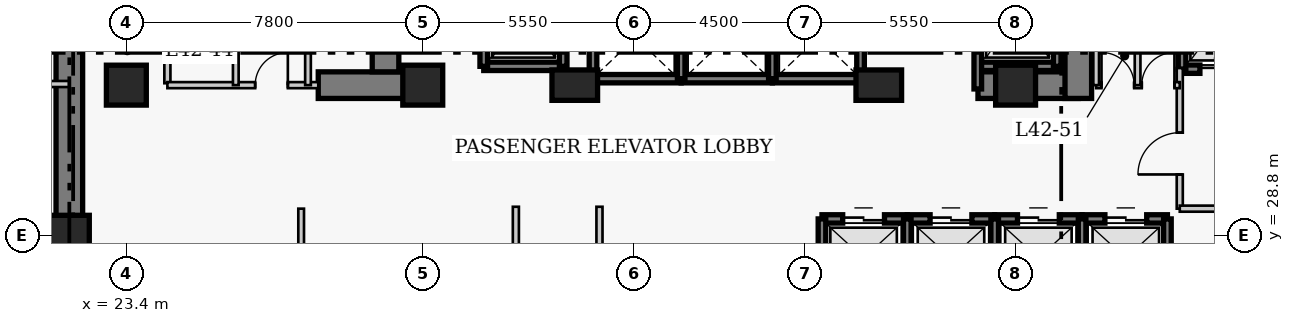
"""IFC4 building model, lengths in metres.
Left out: names, types, materials, properties, quantities, classifications, styles, units other than length and angle.
Written with IfcOpenShell. Run it as: python <this file> out.ifc"""

import sys

from ifc_helpers import new_model, si_unit, direction, frame, frame_2d, origin, origin_2d, place, context, subcontext, project, spatial, rectangle, extrude, element, fill, save


model = new_model("IFC4")
c1 = context("Model", 3, precision=1e-05, world=origin(), true_north=direction((0.0, 1.0)))
c2 = subcontext(c1, "Body", "Model", "MODEL_VIEW")
j1 = project(units=[si_unit("LENGTHUNIT", "METRE"), si_unit("PLANEANGLEUNIT", "RADIAN")], contexts=[c1])
p1 = place(None, origin())
s1 = spatial("IfcSite", under=j1, at=p1, CompositionType="ELEMENT")
p2 = place(p1, origin())
s2 = spatial("IfcBuilding", under=s1, at=p2, CompositionType="ELEMENT")
p3 = place(p2, frame((0.0, 0.0, 168.8)))
s3 = spatial("IfcBuildingStorey", under=s2, at=p3, CompositionType="ELEMENT", Elevation=168.8)
p4 = place(p3, frame((21.9, 27.05, 0.0), z_axis=(0.0, 0.0, 1.0), x_axis=(0.0, 1.0, 0.0)))
e1 = element("IfcWall", 1, at=p4, inside=s3, PredefinedType="SHEAR", context=c2, shape_type="SweptSolid", body=[
    extrude(rectangle(XDim=13.62, YDim=0.7, at=frame_2d((6.81, 0.0))), origin(), (0.0, 0.0, 1.0), 3.8),
])
p5 = place(p3, frame((28.45, 32.75, 0.0), z_axis=(0.0, 0.0, 1.0), x_axis=(1.0, 0.0, 0.0)))
e2 = element("IfcWall", 2, at=p5, inside=s3, PredefinedType="SHEAR", context=c2, shape_type="SweptSolid", body=[
    extrude(rectangle(XDim=2.4, YDim=0.7, at=frame_2d((1.2, 0.0))), origin(), (0.0, 0.0, 1.0), 3.8),
])
p6 = place(p3, frame((45.81, 32.75, 0.0), z_axis=(0.0, 0.0, 1.0), x_axis=(1.0, 0.0, 0.0)))
e3 = element("IfcWall", 3, at=p6, inside=s3, PredefinedType="SHEAR", context=c2, shape_type="SweptSolid", body=[
    extrude(rectangle(XDim=2.64, YDim=0.7, at=frame_2d((1.32, 0.0))), origin(), (0.0, 0.0, 1.0), 3.8),
])
p7 = place(p3, frame((30.22, 33.1, 0.0), z_axis=(0.0, 0.0, 1.0), x_axis=(0.0, 1.0, 0.0)))
e4 = element("IfcWall", 4, at=p7, inside=s3, PredefinedType="SHEAR", context=c2, shape_type="SweptSolid", body=[
    extrude(rectangle(XDim=7.22, YDim=0.7, at=frame_2d((3.61, 0.0))), origin(), (0.0, 0.0, 1.0), 3.8),
])
p8 = place(p3, frame((48.45, 32.4, 0.0), z_axis=(0.0, 0.0, 1.0), x_axis=(0.0, 1.0, 0.0)))
e5 = element("IfcWall", 5, at=p8, inside=s3, PredefinedType="SHEAR", context=c2, shape_type="SweptSolid", body=[
    extrude(rectangle(XDim=7.92, YDim=0.7, at=frame_2d((3.96, 0.0))), origin(), (0.0, 0.0, 1.0), 3.8),
])
p9 = place(p8, frame((5.8, 0.0, 0.0)))
e6 = element("IfcOpeningElement", 6, at=p9, cuts=e5, PredefinedType="OPENING", context=c2, shape_type="SweptSolid", body=[
    extrude(rectangle(XDim=1.1, YDim=2.15, at=frame_2d((0.55, 1.075))), frame((0.0, 0.36, 0.0), z_axis=(0.0, -1.0, 0.0), x_axis=(1.0, 0.0, 0.0)), (0.0, 0.0, 1.0), 0.72),
])
for number, where, z_axis, x_axis in (
    (7, (21.9, 28.8, 0.0), (0.0, 0.0, 1.0), (1.0, 0.0, 0.0)),
    (8, (23.4, 32.75, 0.0), (0.0, 0.0, 1.0), (1.0, 0.0, 0.0)),
    (9, (31.2, 32.75, 0.0), (0.0, 0.0, 1.0), (1.0, 0.0, 0.0)),
):
    element("IfcColumn", number, at=place(p3, frame(where, z_axis=z_axis, x_axis=x_axis)), inside=s3, PredefinedType="COLUMN", context=c2, shape_type="SweptSolid", body=[
        extrude(rectangle(XDim=1.05, YDim=1.05, at=origin_2d()), origin(), (0.0, 0.0, 1.0), 3.8),
    ])
for number, where, z_axis, x_axis in (
    (10, (35.2, 32.75, 0.0), (0.0, 0.0, 1.0), (1.0, 0.0, 0.0)),
    (11, (43.2, 32.75, 0.0), (0.0, 0.0, 1.0), (1.0, 0.0, 0.0)),
):
    element("IfcColumn", number, at=place(p3, frame(where, z_axis=z_axis, x_axis=x_axis)), inside=s3, PredefinedType="COLUMN", context=c2, shape_type="SweptSolid", body=[
        extrude(rectangle(XDim=1.2, YDim=0.8, at=origin_2d()), origin(), (0.0, 0.0, 1.0), 3.8),
    ])
p10 = place(p3, frame((46.8, 32.75, 0.0), z_axis=(0.0, 0.0, 1.0), x_axis=(1.0, 0.0, 0.0)))
e12 = element("IfcColumn", 12, at=p10, inside=s3, PredefinedType="COLUMN", context=c2, shape_type="SweptSolid", body=[
    extrude(rectangle(XDim=1.05, YDim=1.05, at=origin_2d()), origin(), (0.0, 0.0, 1.0), 3.8),
])
p11 = place(p3, frame((41.705, 29.23, 0.0), z_axis=(0.0, 0.0, 1.0), x_axis=(1.0, 0.0, 0.0)))
e13 = element("IfcWall", 13, at=p11, inside=s3, PredefinedType="SHEAR", context=c2, shape_type="SweptSolid", body=[
    extrude(rectangle(XDim=2.245, YDim=0.22, at=frame_2d((1.123, 0.0))), origin(), (0.0, 0.0, 1.0), 3.8),
])
p12 = place(p11, frame((0.545, 0.0, 0.0)))
e14 = element("IfcOpeningElement", 14, at=p12, cuts=e13, PredefinedType="OPENING", context=c2, shape_type="SweptSolid", body=[
    extrude(rectangle(XDim=1.1, YDim=2.15, at=frame_2d((0.55, 1.075))), frame((0.0, 0.12, 0.0), z_axis=(0.0, -1.0, 0.0), x_axis=(1.0, 0.0, 0.0)), (0.0, 0.0, 1.0), 0.24),
])
p13 = place(p3, frame((41.705, 27.17, 0.0), z_axis=(0.0, 0.0, 1.0), x_axis=(0.0, 1.0, 0.0)))
e15 = element("IfcWall", 15, at=p13, inside=s3, PredefinedType="SHEAR", context=c2, shape_type="SweptSolid", body=[
    extrude(rectangle(XDim=2.06, YDim=0.2, at=frame_2d((1.03, 0.0))), origin(), (0.0, 0.0, 1.0), 3.8),
])
p14 = place(p3, frame((43.95, 29.23, 0.0), z_axis=(0.0, 0.0, 1.0), x_axis=(1.0, 0.0, 0.0)))
e16 = element("IfcWall", 16, at=p14, inside=s3, PredefinedType="SHEAR", context=c2, shape_type="SweptSolid", body=[
    extrude(rectangle(XDim=2.3, YDim=0.22, at=frame_2d((1.15, 0.0))), origin(), (0.0, 0.0, 1.0), 3.8),
])
p15 = place(p14, frame((0.6, 0.0, 0.0)))
e17 = element("IfcOpeningElement", 17, at=p15, cuts=e16, PredefinedType="OPENING", context=c2, shape_type="SweptSolid", body=[
    extrude(rectangle(XDim=1.1, YDim=2.15, at=frame_2d((0.55, 1.075))), frame((0.0, 0.12, 0.0), z_axis=(0.0, -1.0, 0.0), x_axis=(1.0, 0.0, 0.0)), (0.0, 0.0, 1.0), 0.24),
])
p16 = place(p3, frame((43.95, 27.17, 0.0), z_axis=(0.0, 0.0, 1.0), x_axis=(0.0, 1.0, 0.0)))
e18 = element("IfcWall", 18, at=p16, inside=s3, PredefinedType="SHEAR", context=c2, shape_type="SweptSolid", body=[
    extrude(rectangle(XDim=2.06, YDim=0.2, at=frame_2d((1.03, 0.0))), origin(), (0.0, 0.0, 1.0), 3.8),
])
p17 = place(p3, frame((46.25, 29.23, 0.0), z_axis=(0.0, 0.0, 1.0), x_axis=(1.0, 0.0, 0.0)))
e19 = element("IfcWall", 19, at=p17, inside=s3, PredefinedType="SHEAR", context=c2, shape_type="SweptSolid", body=[
    extrude(rectangle(XDim=2.3, YDim=0.22, at=frame_2d((1.15, 0.0))), origin(), (0.0, 0.0, 1.0), 3.8),
])
p18 = place(p17, frame((0.6, 0.0, 0.0)))
e20 = element("IfcOpeningElement", 20, at=p18, cuts=e19, PredefinedType="OPENING", context=c2, shape_type="SweptSolid", body=[
    extrude(rectangle(XDim=1.1, YDim=2.15, at=frame_2d((0.55, 1.075))), frame((0.0, 0.12, 0.0), z_axis=(0.0, -1.0, 0.0), x_axis=(1.0, 0.0, 0.0)), (0.0, 0.0, 1.0), 0.24),
])
p19 = place(p3, frame((46.25, 27.17, 0.0), z_axis=(0.0, 0.0, 1.0), x_axis=(0.0, 1.0, 0.0)))
e21 = element("IfcWall", 21, at=p19, inside=s3, PredefinedType="SHEAR", context=c2, shape_type="SweptSolid", body=[
    extrude(rectangle(XDim=2.06, YDim=0.2, at=frame_2d((1.03, 0.0))), origin(), (0.0, 0.0, 1.0), 3.8),
])
p20 = place(p3, frame((48.55, 29.23, 0.0), z_axis=(0.0, 0.0, 1.0), x_axis=(1.0, 0.0, 0.0)))
e22 = element("IfcWall", 22, at=p20, inside=s3, PredefinedType="SHEAR", context=c2, shape_type="SweptSolid", body=[
    extrude(rectangle(XDim=2.245, YDim=0.22, at=frame_2d((1.123, 0.0))), origin(), (0.0, 0.0, 1.0), 3.8),
])
p21 = place(p20, frame((0.6, 0.0, 0.0)))
e23 = element("IfcOpeningElement", 23, at=p21, cuts=e22, PredefinedType="OPENING", context=c2, shape_type="SweptSolid", body=[
    extrude(rectangle(XDim=1.1, YDim=2.15, at=frame_2d((0.55, 1.075))), frame((0.0, 0.12, 0.0), z_axis=(0.0, -1.0, 0.0), x_axis=(1.0, 0.0, 0.0)), (0.0, 0.0, 1.0), 0.24),
])
for number, where, z_axis, x_axis in (
    (24, (48.55, 27.17, 0.0), (0.0, 0.0, 1.0), (0.0, 1.0, 0.0)),
    (25, (50.795, 27.17, 0.0), (0.0, 0.0, 1.0), (0.0, 1.0, 0.0)),
):
    element("IfcWall", number, at=place(p3, frame(where, z_axis=z_axis, x_axis=x_axis)), inside=s3, PredefinedType="SHEAR", context=c2, shape_type="SweptSolid", body=[
        extrude(rectangle(XDim=2.06, YDim=0.2, at=frame_2d((1.03, 0.0))), origin(), (0.0, 0.0, 1.0), 3.8),
    ])
p22 = place(p3, frame((35.68, 32.92, 0.0), z_axis=(0.0, 0.0, 1.0), x_axis=(1.0, 0.0, 0.0)))
e26 = element("IfcWall", 26, at=p22, inside=s3, PredefinedType="SHEAR", context=c2, shape_type="SweptSolid", body=[
    extrude(rectangle(XDim=2.32, YDim=0.22, at=frame_2d((1.16, 0.0))), origin(), (0.0, 0.0, 1.0), 3.8),
])
p23 = place(p3, frame((35.68, 32.92, 0.0), z_axis=(0.0, 0.0, 1.0), x_axis=(0.0, 1.0, 0.0)))
e27 = element("IfcWall", 27, at=p23, inside=s3, PredefinedType="SHEAR", context=c2, shape_type="SweptSolid", body=[
    extrude(rectangle(XDim=2.16, YDim=0.2, at=frame_2d((1.08, 0.0))), origin(), (0.0, 0.0, 1.0), 3.8),
])
p24 = place(p3, frame((38.0, 32.92, 0.0), z_axis=(0.0, 0.0, 1.0), x_axis=(1.0, 0.0, 0.0)))
e28 = element("IfcWall", 28, at=p24, inside=s3, PredefinedType="SHEAR", context=c2, shape_type="SweptSolid", body=[
    extrude(rectangle(XDim=2.4, YDim=0.22, at=frame_2d((1.2, 0.0))), origin(), (0.0, 0.0, 1.0), 3.8),
])
p25 = place(p3, frame((38.0, 32.92, 0.0), z_axis=(0.0, 0.0, 1.0), x_axis=(0.0, 1.0, 0.0)))
e29 = element("IfcWall", 29, at=p25, inside=s3, PredefinedType="SHEAR", context=c2, shape_type="SweptSolid", body=[
    extrude(rectangle(XDim=2.16, YDim=0.2, at=frame_2d((1.08, 0.0))), origin(), (0.0, 0.0, 1.0), 3.8),
])
p26 = place(p3, frame((40.4, 32.92, 0.0), z_axis=(0.0, 0.0, 1.0), x_axis=(1.0, 0.0, 0.0)))
e30 = element("IfcWall", 30, at=p26, inside=s3, PredefinedType="SHEAR", context=c2, shape_type="SweptSolid", body=[
    extrude(rectangle(XDim=2.32, YDim=0.22, at=frame_2d((1.16, 0.0))), origin(), (0.0, 0.0, 1.0), 3.8),
])
for number, where, z_axis, x_axis in (
    (31, (40.4, 32.92, 0.0), (0.0, 0.0, 1.0), (0.0, 1.0, 0.0)),
    (32, (42.72, 32.92, 0.0), (0.0, 0.0, 1.0), (0.0, 1.0, 0.0)),
):
    element("IfcWall", number, at=place(p3, frame(where, z_axis=z_axis, x_axis=x_axis)), inside=s3, PredefinedType="SHEAR", context=c2, shape_type="SweptSolid", body=[
        extrude(rectangle(XDim=2.16, YDim=0.2, at=frame_2d((1.08, 0.0))), origin(), (0.0, 0.0, 1.0), 3.8),
    ])
p27 = place(p3, frame((51.18, 33.17, 0.0), z_axis=(0.0, 0.0, 1.0), x_axis=(1.0, 0.0, 0.0)))
e33 = element("IfcWall", 33, at=p27, inside=s3, PredefinedType="SHEAR", context=c2, shape_type="SweptSolid", body=[
    extrude(rectangle(XDim=2.42, YDim=0.22, at=frame_2d((1.21, 0.0))), origin(), (0.0, 0.0, 1.0), 3.8),
])
p28 = place(p27, frame((0.47, 0.0, 0.0)))
e34 = element("IfcOpeningElement", 34, at=p28, cuts=e33, PredefinedType="OPENING", context=c2, shape_type="SweptSolid", body=[
    extrude(rectangle(XDim=1.3, YDim=2.15, at=frame_2d((0.65, 1.075))), frame((0.0, 0.12, 0.0), z_axis=(0.0, -1.0, 0.0), x_axis=(1.0, 0.0, 0.0)), (0.0, 0.0, 1.0), 0.24),
])
p29 = place(p3, frame((51.18, 33.17, 0.0), z_axis=(0.0, 0.0, 1.0), x_axis=(0.0, 1.0, 0.0)))
e35 = element("IfcWall", 35, at=p29, inside=s3, PredefinedType="SHEAR", context=c2, shape_type="SweptSolid", body=[
    extrude(rectangle(XDim=2.86, YDim=0.2, at=frame_2d((1.43, 0.0))), origin(), (0.0, 0.0, 1.0), 3.8),
])
p30 = place(p3, frame((32.805, 33.245, 0.0), z_axis=(0.0, 0.0, 1.0), x_axis=(1.0, 0.0, 0.0)))
e36 = element("IfcWall", 36, at=p30, inside=s3, PredefinedType="SHEAR", context=c2, shape_type="SweptSolid", body=[
    extrude(rectangle(XDim=2.09, YDim=0.22, at=frame_2d((1.045, 0.0))), origin(), (0.0, 0.0, 1.0), 3.8),
])
for number, where, z_axis, x_axis in (
    (37, (32.805, 33.245, 0.0), (0.0, 0.0, 1.0), (0.0, 1.0, 0.0)),
    (38, (34.895, 33.245, 0.0), (0.0, 0.0, 1.0), (0.0, 1.0, 0.0)),
):
    element("IfcWall", number, at=place(p3, frame(where, z_axis=z_axis, x_axis=x_axis)), inside=s3, PredefinedType="SHEAR", context=c2, shape_type="SweptSolid", body=[
        extrude(rectangle(XDim=2.91, YDim=0.2, at=frame_2d((1.455, 0.0))), origin(), (0.0, 0.0, 1.0), 3.8),
    ])
p31 = place(p3, frame((45.805, 33.245, 0.0), z_axis=(0.0, 0.0, 1.0), x_axis=(1.0, 0.0, 0.0)))
e39 = element("IfcWall", 39, at=p31, inside=s3, PredefinedType="SHEAR", context=c2, shape_type="SweptSolid", body=[
    extrude(rectangle(XDim=2.09, YDim=0.22, at=frame_2d((1.045, 0.0))), origin(), (0.0, 0.0, 1.0), 3.8),
])
p32 = place(p3, frame((45.805, 32.65, 0.0), z_axis=(0.0, 0.0, 1.0), x_axis=(0.0, 1.0, 0.0)))
e40 = element("IfcWall", 40, at=p32, inside=s3, PredefinedType="SHEAR", context=c2, shape_type="SweptSolid", body=[
    extrude(rectangle(XDim=3.505, YDim=0.2, at=frame_2d((1.752, 0.0))), origin(), (0.0, 0.0, 1.0), 3.8),
])
p33 = place(p3, frame((47.895, 33.245, 0.0), z_axis=(0.0, 0.0, 1.0), x_axis=(0.0, 1.0, 0.0)))
e41 = element("IfcWall", 41, at=p33, inside=s3, PredefinedType="SHEAR", context=c2, shape_type="SweptSolid", body=[
    extrude(rectangle(XDim=2.91, YDim=0.2, at=frame_2d((1.455, 0.0))), origin(), (0.0, 0.0, 1.0), 3.8),
])
p34 = place(p3, frame((24.48, 32.8, 0.0), z_axis=(0.0, 0.0, 1.0), x_axis=(0.0, 1.0, 0.0)))
e42 = element("IfcWall", 42, at=p34, inside=s3, PredefinedType="PARTITIONING", context=c2, shape_type="SweptSolid", body=[
    extrude(rectangle(XDim=3.57, YDim=0.16, at=frame_2d((1.785, 0.0))), origin(), (0.0, 0.0, 1.0), 3.55),
])
p35 = place(p34, frame((1.604, 0.0, 0.0)))
e43 = element("IfcOpeningElement", 43, at=p35, cuts=e42, PredefinedType="OPENING", context=c2, shape_type="SweptSolid", body=[
    extrude(rectangle(XDim=0.9, YDim=2.1, at=frame_2d((0.45, 1.05))), frame((0.0, 0.09, 0.0), z_axis=(0.0, -1.0, 0.0), x_axis=(1.0, 0.0, 0.0)), (0.0, 0.0, 1.0), 0.18),
])
p36 = place(p3, frame((51.12, 29.5, 0.0), z_axis=(0.0, 0.0, 1.0), x_axis=(0.0, 1.0, 0.0)))
e44 = element("IfcWall", 44, at=p36, inside=s3, PredefinedType="PARTITIONING", context=c2, shape_type="SweptSolid", body=[
    extrude(rectangle(XDim=3.7, YDim=0.16, at=frame_2d((1.85, 0.0))), origin(), (0.0, 0.0, 1.0), 3.55),
])
p37 = place(p36, frame((0.9, 0.0, 0.0)))
e45 = element("IfcOpeningElement", 45, at=p37, cuts=e44, PredefinedType="OPENING", context=c2, shape_type="SweptSolid", body=[
    extrude(rectangle(XDim=1.1, YDim=2.15, at=frame_2d((0.55, 1.075))), frame((0.0, 0.09, 0.0), z_axis=(0.0, -1.0, 0.0), x_axis=(1.0, 0.0, 0.0)), (0.0, 0.0, 1.0), 0.18),
])
p38 = place(p3, frame((51.12, 29.5, 0.0), z_axis=(0.0, 0.0, 1.0), x_axis=(1.0, 0.0, 0.0)))
e46 = element("IfcWall", 46, at=p38, inside=s3, PredefinedType="PARTITIONING", context=c2, shape_type="SweptSolid", body=[
    extrude(rectangle(XDim=5.63, YDim=0.16, at=frame_2d((2.815, 0.0))), origin(), (0.0, 0.0, 1.0), 3.55),
])
p39 = place(p3, frame((24.48, 32.75, 0.0), z_axis=(0.0, 0.0, 1.0), x_axis=(1.0, 0.0, 0.0)))
e47 = element("IfcWall", 47, at=p39, inside=s3, PredefinedType="PARTITIONING", context=c2, shape_type="SweptSolid", body=[
    extrude(rectangle(XDim=3.97, YDim=0.16, at=frame_2d((1.985, 0.0))), origin(), (0.0, 0.0, 1.0), 3.55),
])
p40 = place(p39, frame((2.31, 0.0, 0.0)))
e48 = element("IfcOpeningElement", 48, at=p40, cuts=e47, PredefinedType="OPENING", context=c2, shape_type="SweptSolid", body=[
    extrude(rectangle(XDim=0.86, YDim=2.05, at=frame_2d((0.43, 1.025))), frame((0.0, 0.09, 0.0), z_axis=(0.0, -1.0, 0.0), x_axis=(1.0, 0.0, 0.0)), (0.0, 0.0, 1.0), 0.18),
])
p41 = place(p3, frame((48.92, 32.75, 0.0), z_axis=(0.0, 0.0, 1.0), x_axis=(1.0, 0.0, 0.0)))
e49 = element("IfcWall", 49, at=p41, inside=s3, PredefinedType="PARTITIONING", context=c2, shape_type="SweptSolid", body=[
    extrude(rectangle(XDim=2.2, YDim=0.16, at=frame_2d((1.1, 0.0))), origin(), (0.0, 0.0, 1.0), 3.55),
])
p42 = place(p41, frame((0.14, 0.0, 0.0)))
e50 = element("IfcOpeningElement", 50, at=p42, cuts=e49, PredefinedType="OPENING", context=c2, shape_type="SweptSolid", body=[
    extrude(rectangle(XDim=0.86, YDim=2.05, at=frame_2d((0.43, 1.025))), frame((0.0, 0.09, 0.0), z_axis=(0.0, -1.0, 0.0), x_axis=(1.0, 0.0, 0.0)), (0.0, 0.0, 1.0), 0.18),
])
p43 = place(p41, frame((1.2, 0.0, 0.0)))
e51 = element("IfcOpeningElement", 51, at=p43, cuts=e49, PredefinedType="OPENING", context=c2, shape_type="SweptSolid", body=[
    extrude(rectangle(XDim=0.86, YDim=2.05, at=frame_2d((0.43, 1.025))), frame((0.0, 0.09, 0.0), z_axis=(0.0, -1.0, 0.0), x_axis=(1.0, 0.0, 0.0)), (0.0, 0.0, 1.0), 0.18),
])
for number, where, z_axis, x_axis in (
    (52, (48.92, 32.75, 0.0), (0.0, 0.0, 1.0), (0.0, 1.0, 0.0)),
    (53, (26.28, 32.75, 0.0), (0.0, 0.0, 1.0), (0.0, 1.0, 0.0)),
    (54, (28.18, 32.75, 0.0), (0.0, 0.0, 1.0), (0.0, 1.0, 0.0)),
    (55, (50.01, 32.75, 0.0), (0.0, 0.0, 1.0), (0.0, 1.0, 0.0)),
):
    element("IfcWall", number, at=place(p3, frame(where, z_axis=z_axis, x_axis=x_axis)), inside=s3, PredefinedType="PARTITIONING", context=c2, shape_type="SweptSolid", body=[
        extrude(rectangle(XDim=3.62, YDim=0.15, at=frame_2d((1.81, 0.0))), origin(), (0.0, 0.0, 1.0), 3.55),
    ])
for number, where, z_axis, x_axis in (
    (56, (33.65, 16.51, 0.0), (0.0, 0.0, 1.0), (0.0, 1.0, 0.0)),
    (57, (35.85, 16.51, 0.0), (0.0, 0.0, 1.0), (0.0, 1.0, 0.0)),
):
    element("IfcWall", number, at=place(p3, frame(where, z_axis=z_axis, x_axis=x_axis)), inside=s3, PredefinedType="PARTITIONING", context=c2, shape_type="SweptSolid", body=[
        extrude(rectangle(XDim=13.04, YDim=0.16, at=frame_2d((6.52, 0.0))), origin(), (0.0, 0.0, 1.0), 3.55),
    ])
p44 = place(p3, frame((19.41, 32.78, 0.0), z_axis=(0.0, 0.0, 1.0), x_axis=(1.0, 0.0, 0.0)))
e58 = element("IfcWall", 58, at=p44, inside=s3, PredefinedType="PARTITIONING", context=c2, shape_type="SweptSolid", body=[
    extrude(rectangle(XDim=2.49, YDim=0.16, at=frame_2d((1.245, 0.0))), origin(), (0.0, 0.0, 1.0), 3.55),
])
p45 = place(p3, frame((28.0, 16.51, 0.0), z_axis=(0.0, 0.0, 1.0), x_axis=(0.0, 1.0, 0.0)))
e59 = element("IfcWall", 59, at=p45, inside=s3, PredefinedType="PARTITIONING", context=c2, shape_type="SweptSolid", body=[
    extrude(rectangle(XDim=12.99, YDim=0.15, at=frame_2d((6.495, 0.0))), origin(), (0.0, 0.0, 1.0), 3.55),
])
p46 = place(p12, origin())
e60 = element("IfcDoor", 60, at=p46, inside=s3, OperationType="DOUBLE_DOOR_SLIDING", PredefinedType="DOOR", context=c2, shape_type="SweptSolid", body=[
    extrude(rectangle(XDim=1.1, YDim=2.15, at=frame_2d((0.55, 1.075))), frame((0.0, 0.025, 0.0), z_axis=(0.0, -1.0, 0.0), x_axis=(1.0, 0.0, 0.0)), (0.0, 0.0, 1.0), 0.05),
])
fill(e14, e60)
p47 = place(p15, origin())
e61 = element("IfcDoor", 61, at=p47, inside=s3, OperationType="DOUBLE_DOOR_SLIDING", PredefinedType="DOOR", context=c2, shape_type="SweptSolid", body=[
    extrude(rectangle(XDim=1.1, YDim=2.15, at=frame_2d((0.55, 1.075))), frame((0.0, 0.025, 0.0), z_axis=(0.0, -1.0, 0.0), x_axis=(1.0, 0.0, 0.0)), (0.0, 0.0, 1.0), 0.05),
])
fill(e17, e61)
p48 = place(p18, origin())
e62 = element("IfcDoor", 62, at=p48, inside=s3, OperationType="DOUBLE_DOOR_SLIDING", PredefinedType="DOOR", context=c2, shape_type="SweptSolid", body=[
    extrude(rectangle(XDim=1.1, YDim=2.15, at=frame_2d((0.55, 1.075))), frame((0.0, 0.025, 0.0), z_axis=(0.0, -1.0, 0.0), x_axis=(1.0, 0.0, 0.0)), (0.0, 0.0, 1.0), 0.05),
])
fill(e20, e62)
p49 = place(p21, origin())
e63 = element("IfcDoor", 63, at=p49, inside=s3, OperationType="DOUBLE_DOOR_SLIDING", PredefinedType="DOOR", context=c2, shape_type="SweptSolid", body=[
    extrude(rectangle(XDim=1.1, YDim=2.15, at=frame_2d((0.55, 1.075))), frame((0.0, 0.025, 0.0), z_axis=(0.0, -1.0, 0.0), x_axis=(1.0, 0.0, 0.0)), (0.0, 0.0, 1.0), 0.05),
])
fill(e23, e63)
p50 = place(p28, origin())
e64 = element("IfcDoor", 64, at=p50, inside=s3, OperationType="DOUBLE_DOOR_SLIDING", PredefinedType="DOOR", context=c2, shape_type="SweptSolid", body=[
    extrude(rectangle(XDim=1.3, YDim=2.15, at=frame_2d((0.65, 1.075))), frame((0.0, 0.025, 0.0), z_axis=(0.0, -1.0, 0.0), x_axis=(1.0, 0.0, 0.0)), (0.0, 0.0, 1.0), 0.05),
])
fill(e34, e64)
p51 = place(p37, origin())
e65 = element("IfcDoor", 65, at=p51, inside=s3, OperationType="SINGLE_SWING_LEFT", PredefinedType="DOOR", context=c2, shape_type="SweptSolid", body=[
    extrude(rectangle(XDim=1.1, YDim=2.15, at=frame_2d((0.55, 1.075))), frame((0.0, 0.025, 0.0), z_axis=(0.0, -1.0, 0.0), x_axis=(1.0, 0.0, 0.0)), (0.0, 0.0, 1.0), 0.05),
])
fill(e45, e65)
p52 = place(p40, origin())
e66 = element("IfcDoor", 66, at=p52, inside=s3, OperationType="SINGLE_SWING_RIGHT", PredefinedType="DOOR", context=c2, shape_type="SweptSolid", body=[
    extrude(rectangle(XDim=0.86, YDim=2.05, at=frame_2d((0.43, 1.025))), frame((0.0, 0.025, 0.0), z_axis=(0.0, -1.0, 0.0), x_axis=(1.0, 0.0, 0.0)), (0.0, 0.0, 1.0), 0.05),
])
fill(e48, e66)
p53 = place(p42, origin())
e67 = element("IfcDoor", 67, at=p53, inside=s3, OperationType="SINGLE_SWING_LEFT", PredefinedType="DOOR", context=c2, shape_type="SweptSolid", body=[
    extrude(rectangle(XDim=0.86, YDim=2.05, at=frame_2d((0.43, 1.025))), frame((0.0, 0.025, 0.0), z_axis=(0.0, -1.0, 0.0), x_axis=(1.0, 0.0, 0.0)), (0.0, 0.0, 1.0), 0.05),
])
fill(e50, e67)
p54 = place(p43, origin())
e68 = element("IfcDoor", 68, at=p54, inside=s3, OperationType="SINGLE_SWING_RIGHT", PredefinedType="DOOR", context=c2, shape_type="SweptSolid", body=[
    extrude(rectangle(XDim=0.86, YDim=2.05, at=frame_2d((0.43, 1.025))), frame((0.0, 0.025, 0.0), z_axis=(0.0, -1.0, 0.0), x_axis=(1.0, 0.0, 0.0)), (0.0, 0.0, 1.0), 0.05),
])
fill(e51, e68)
save(model, sys.argv[1])
